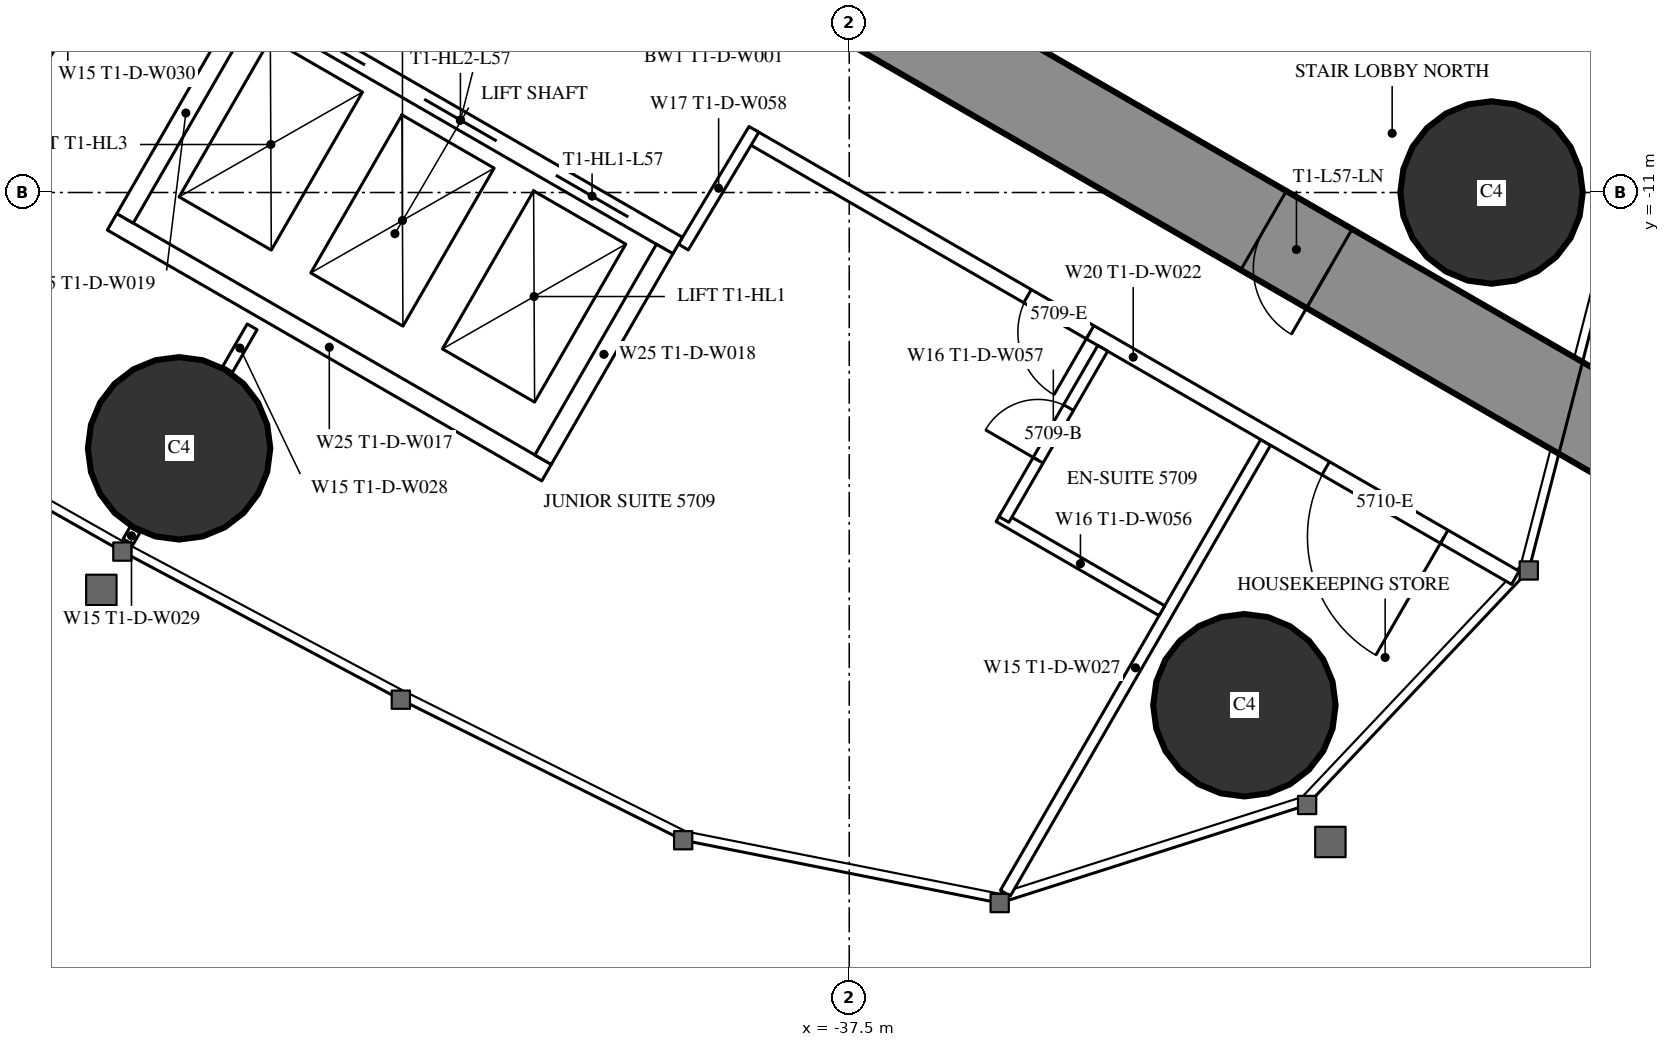
"""IFC4 building model, lengths in metres.
Left out: names, types, materials, properties, quantities, classifications, styles, units other than length and angle.
Written with IfcOpenShell. Run it as: python <this file> out.ifc"""

import sys

from ifc_helpers import new_model, si_unit, direction, frame, frame_2d, origin, origin_2d, place, context, subcontext, project, spatial, rectangle, circle, extrude, element, fill, save


model = new_model("IFC4")
c1 = context("Model", 3, precision=1e-05, world=origin(), true_north=direction((0.0, 1.0)))
c2 = subcontext(c1, "Body", "Model", "MODEL_VIEW")
j1 = project(units=[si_unit("LENGTHUNIT", "METRE"), si_unit("PLANEANGLEUNIT", "RADIAN")], contexts=[c1])
p1 = place(None, origin())
s1 = spatial("IfcSite", under=j1, at=p1, CompositionType="ELEMENT")
p2 = place(p1, origin())
s2 = spatial("IfcBuilding", under=s1, at=p2, CompositionType="ELEMENT")
p3 = place(p2, frame((0.0, 0.0, 215.3)))
s3 = spatial("IfcBuildingStorey", under=s2, at=p3, CompositionType="ELEMENT", Elevation=215.3)
for number, where, z_axis, x_axis in (
    (1, (-32.301, -17.745, 0.0), (0.0, 0.0, 1.0), (1.0, 0.0, 0.0)),
    (2, (-29.05, -11.0, 0.0), (0.0, 0.0, 1.0), (1.0, 0.0, 0.0)),
    (3, (-46.317, -14.365, 0.0), (0.0, 0.0, 1.0), (1.0, 0.0, 0.0)),
):
    element("IfcColumn", number, at=place(p3, frame(where, z_axis=z_axis, x_axis=x_axis)), inside=s3, PredefinedType="COLUMN", context=c2, shape_type="SweptSolid", body=[
        extrude(circle(Radius=1.2, at=origin_2d()), origin(), (0.0, 0.0, 1.0), 3.6),
    ])
p4 = place(p3, frame((-27.2, -14.3, 0.0), z_axis=(0.0, 0.0, 1.0), x_axis=(-0.866024021859, 0.500002393557, 0.0)))
e4 = element("IfcWall", 4, at=p4, inside=s3, PredefinedType="SHEAR", context=c2, shape_type="SweptSolid", body=[
    extrude(rectangle(XDim=27.907, YDim=1.2, at=frame_2d((13.954, 0.0))), origin(), (0.0, 0.0, 1.0), 3.6),
])
p5 = place(p4, frame((4.6, 0.0, 0.0)))
e5 = element("IfcOpeningElement", 5, at=p5, cuts=e4, PredefinedType="OPENING", context=c2, shape_type="SweptSolid", body=[
    extrude(rectangle(XDim=1.0, YDim=2.2, at=frame_2d((0.5, 1.1))), frame((0.0, 0.61, 0.0), z_axis=(0.0, -1.0, 0.0), x_axis=(1.0, 0.0, 0.0)), (0.0, 0.0, 1.0), 1.22),
])
p6 = place(p4, frame((13.395, 0.0, 0.0)))
e6 = element("IfcOpeningElement", 6, at=p6, cuts=e4, PredefinedType="OPENING", context=c2, shape_type="SweptSolid", body=[
    extrude(rectangle(XDim=1.8, YDim=2.2, at=frame_2d((0.9, 1.1))), frame((0.0, 0.61, 0.0), z_axis=(0.0, -1.0, 0.0), x_axis=(1.0, 0.0, 0.0)), (0.0, 0.0, 1.0), 1.22),
])
p7 = place(p3, frame((-32.022, -14.287, 0.0), z_axis=(0.0, 0.0, 1.0), x_axis=(-0.50000019414, -0.866025291697, 0.0)))
e7 = element("IfcWall", 7, at=p7, inside=s3, PredefinedType="PARTITIONING", context=c2, shape_type="SweptSolid", body=[
    extrude(rectangle(XDim=6.848, YDim=0.15, at=frame_2d((3.424, 0.0))), origin(), (0.0, 0.0, 1.0), 3.35),
])
p8 = place(p3, frame((-46.898, -15.439, 0.0), z_axis=(0.0, 0.0, 1.0), x_axis=(-0.500232303069, -0.865891241997, 0.0)))
e8 = element("IfcWall", 8, at=p8, inside=s3, PredefinedType="PARTITIONING", context=c2, shape_type="SweptSolid", body=[
    extrude(rectangle(XDim=0.18, YDim=0.15, at=frame_2d((0.09, 0.0))), origin(), (0.0, 0.0, 1.0), 2.45),
])
p9 = place(p3, frame((-46.274, -6.059, 0.0), z_axis=(0.0, 0.0, 1.0), x_axis=(-0.500020471368, -0.866013584312, 0.0)))
e9 = element("IfcWall", 9, at=p9, inside=s3, PredefinedType="PARTITIONING", context=c2, shape_type="SweptSolid", body=[
    extrude(rectangle(XDim=6.028, YDim=0.15, at=frame_2d((3.014, 0.0))), origin(), (0.0, 0.0, 1.0), 2.45),
])
p10 = place(p3, frame((-45.356, -12.767, 0.0), z_axis=(0.0, 0.0, 1.0), x_axis=(-0.499886366516, -0.866091000168, 0.0)))
e10 = element("IfcWall", 10, at=p10, inside=s3, PredefinedType="PARTITIONING", context=c2, shape_type="SweptSolid", body=[
    extrude(rectangle(XDim=0.645, YDim=0.15, at=frame_2d((0.322, 0.0))), origin(), (0.0, 0.0, 1.0), 3.35),
])
p11 = place(p3, frame((-28.737, -16.068, 0.0), z_axis=(0.0, 0.0, 1.0), x_axis=(-0.866029399323, 0.49999307946, 0.0)))
e11 = element("IfcWall", 11, at=p11, inside=s3, PredefinedType="PARTITIONING", context=c2, shape_type="SweptSolid", body=[
    extrude(rectangle(XDim=11.61, YDim=0.2, at=frame_2d((5.805, 0.0))), origin(), (0.0, 0.0, 1.0), 3.35),
])
p12 = place(p11, frame((1.08, 0.0, 0.0)))
e12 = element("IfcOpeningElement", 12, at=p12, cuts=e11, PredefinedType="OPENING", context=c2, shape_type="SweptSolid", body=[
    extrude(rectangle(XDim=1.8, YDim=2.03, at=frame_2d((0.9, 1.015))), frame((0.0, 0.11, 0.0), z_axis=(0.0, -1.0, 0.0), x_axis=(1.0, 0.0, 0.0)), (0.0, 0.0, 1.0), 0.22),
])
p13 = place(p11, frame((6.46, 0.0, 0.0)))
e13 = element("IfcOpeningElement", 13, at=p13, cuts=e11, PredefinedType="OPENING", context=c2, shape_type="SweptSolid", body=[
    extrude(rectangle(XDim=0.95, YDim=2.2, at=frame_2d((0.475, 1.1))), frame((0.0, 0.11, 0.0), z_axis=(0.0, -1.0, 0.0), x_axis=(1.0, 0.0, 0.0)), (0.0, 0.0, 1.0), 0.22),
])
p14 = place(p3, frame((-39.683, -11.718, 0.0), z_axis=(0.0, 0.0, 1.0), x_axis=(0.514336634837, 0.857588377991, 0.0)))
e14 = element("IfcWall", 14, at=p14, inside=s3, PredefinedType="PARTITIONING", context=c2, shape_type="SweptSolid", body=[
    extrude(rectangle(XDim=1.805, YDim=0.15, at=frame_2d((0.903, 0.0))), origin(), (0.0, 0.0, 1.0), 3.35),
])
p15 = place(p3, frame((-33.387, -16.502, 0.0), z_axis=(0.0, 0.0, 1.0), x_axis=(-0.866006523861, 0.500032699561, 0.0)))
e15 = element("IfcWall", 15, at=p15, inside=s3, PredefinedType="PARTITIONING", context=c2, shape_type="SweptSolid", body=[
    extrude(rectangle(XDim=2.475, YDim=0.15, at=frame_2d((1.237, 0.0))), origin(), (0.0, 0.0, 1.0), 3.35),
])
p16 = place(p3, frame((-34.165, -13.05, 0.0), z_axis=(0.0, 0.0, 1.0), x_axis=(-0.500047596559, -0.865997922154, 0.0)))
e16 = element("IfcWall", 16, at=p16, inside=s3, PredefinedType="PARTITIONING", context=c2, shape_type="SweptSolid", body=[
    extrude(rectangle(XDim=2.6, YDim=0.15, at=frame_2d((1.3, 0.0))), origin(), (0.0, 0.0, 1.0), 3.35),
])
p17 = place(p16, frame((0.9, 0.0, 0.0)))
e17 = element("IfcOpeningElement", 17, at=p17, cuts=e16, PredefinedType="OPENING", context=c2, shape_type="SweptSolid", body=[
    extrude(rectangle(XDim=0.8, YDim=2.2, at=frame_2d((0.4, 1.1))), frame((0.0, 0.085, 0.0), z_axis=(0.0, -1.0, 0.0), x_axis=(1.0, 0.0, 0.0)), (0.0, 0.0, 1.0), 0.17),
])
p18 = place(p3, frame((-39.758, -11.697, 0.0), z_axis=(0.0, 0.0, 1.0), x_axis=(-0.866024194504, 0.500002094529, 0.0)))
e18 = element("IfcWall", 18, at=p18, inside=s3, PredefinedType="PARTITIONING", context=c2, shape_type="SweptSolid", body=[
    extrude(rectangle(XDim=6.6, YDim=0.25, at=frame_2d((3.3, 0.0))), origin(), (0.0, 0.0, 1.0), 3.35),
])
p19 = place(p18, frame((0.75, 0.0, 0.0)))
e19 = element("IfcOpeningElement", 19, at=p19, cuts=e18, PredefinedType="OPENING", context=c2, shape_type="SweptSolid", body=[
    extrude(rectangle(XDim=1.1, YDim=2.2, at=frame_2d((0.55, 1.1))), frame((0.0, 0.135, 0.0), z_axis=(0.0, -1.0, 0.0), x_axis=(1.0, 0.0, 0.0)), (0.0, 0.0, 1.0), 0.27),
])
p20 = place(p18, frame((2.75, 0.0, 0.0)))
e20 = element("IfcOpeningElement", 20, at=p20, cuts=e18, PredefinedType="OPENING", context=c2, shape_type="SweptSolid", body=[
    extrude(rectangle(XDim=1.1, YDim=2.2, at=frame_2d((0.55, 1.1))), frame((0.0, 0.135, 0.0), z_axis=(0.0, -1.0, 0.0), x_axis=(1.0, 0.0, 0.0)), (0.0, 0.0, 1.0), 0.27),
])
p21 = place(p18, frame((4.75, 0.0, 0.0)))
e21 = element("IfcOpeningElement", 21, at=p21, cuts=e18, PredefinedType="OPENING", context=c2, shape_type="SweptSolid", body=[
    extrude(rectangle(XDim=1.1, YDim=2.2, at=frame_2d((0.55, 1.1))), frame((0.0, 0.135, 0.0), z_axis=(0.0, -1.0, 0.0), x_axis=(1.0, 0.0, 0.0)), (0.0, 0.0, 1.0), 0.27),
])
p22 = place(p3, frame((-41.482, -14.686, 0.0), z_axis=(0.0, 0.0, 1.0), x_axis=(-0.86603344179, 0.499986077507, 0.0)))
e22 = element("IfcWall", 22, at=p22, inside=s3, PredefinedType="PARTITIONING", context=c2, shape_type="SweptSolid", body=[
    extrude(rectangle(XDim=6.6, YDim=0.25, at=frame_2d((3.3, 0.0))), origin(), (0.0, 0.0, 1.0), 3.35),
])
for number, where, z_axis, x_axis in (
    (23, (-39.928, -11.743, 0.0), (0.0, 0.0, 1.0), (-0.5, -0.866, 0.0)),
    (24, (-45.428, -8.568, 0.0), (0.0, 0.0, 1.0), (-0.5, -0.866, 0.0)),
):
    element("IfcWall", number, at=place(p3, frame(where, z_axis=z_axis, x_axis=x_axis)), inside=s3, PredefinedType="PARTITIONING", context=c2, shape_type="SweptSolid", body=[
        extrude(rectangle(XDim=3.201, YDim=0.25, at=frame_2d((1.6, 0.0))), origin(), (0.0, 0.0, 1.0), 3.35),
    ])
p23 = place(p12, origin())
e25 = element("IfcDoor", 25, at=p23, inside=s3, OperationType="DOUBLE_DOOR_SINGLE_SWING", PredefinedType="DOOR", context=c2, shape_type="SweptSolid", body=[
    extrude(rectangle(XDim=1.8, YDim=2.03, at=frame_2d((0.9, 1.015))), frame((0.0, 0.025, 0.0), z_axis=(0.0, -1.0, 0.0), x_axis=(1.0, 0.0, 0.0)), (0.0, 0.0, 1.0), 0.05),
])
fill(e12, e25)
p24 = place(p17, origin())
e26 = element("IfcDoor", 26, at=p24, inside=s3, OperationType="SINGLE_SWING_RIGHT", PredefinedType="DOOR", context=c2, shape_type="SweptSolid", body=[
    extrude(rectangle(XDim=0.8, YDim=2.2, at=frame_2d((0.4, 1.1))), frame((0.0, 0.025, 0.0), z_axis=(0.0, -1.0, 0.0), x_axis=(1.0, 0.0, 0.0)), (0.0, 0.0, 1.0), 0.05),
])
fill(e17, e26)
p25 = place(p13, origin())
e27 = element("IfcDoor", 27, at=p25, inside=s3, OperationType="SINGLE_SWING_LEFT", PredefinedType="DOOR", context=c2, shape_type="SweptSolid", body=[
    extrude(rectangle(XDim=0.95, YDim=2.2, at=frame_2d((0.475, 1.1))), frame((0.0, 0.025, 0.0), z_axis=(0.0, -1.0, 0.0), x_axis=(1.0, 0.0, 0.0)), (0.0, 0.0, 1.0), 0.05),
])
fill(e13, e27)
p26 = place(p5, origin())
e28 = element("IfcDoor", 28, at=p26, inside=s3, OperationType="SINGLE_SWING_LEFT", PredefinedType="DOOR", context=c2, shape_type="SweptSolid", body=[
    extrude(rectangle(XDim=1.0, YDim=2.2, at=frame_2d((0.5, 1.1))), frame((0.0, 0.025, 0.0), z_axis=(0.0, -1.0, 0.0), x_axis=(1.0, 0.0, 0.0)), (0.0, 0.0, 1.0), 0.05),
])
fill(e5, e28)
p27 = place(p19, origin())
e29 = element("IfcDoor", 29, at=p27, inside=s3, OperationType="DOUBLE_DOOR_SLIDING", PredefinedType="USERDEFINED", context=c2, shape_type="SweptSolid", body=[
    extrude(rectangle(XDim=1.1, YDim=2.2, at=frame_2d((0.55, 1.1))), frame((0.0, 0.025, 0.0), z_axis=(0.0, -1.0, 0.0), x_axis=(1.0, 0.0, 0.0)), (0.0, 0.0, 1.0), 0.05),
])
fill(e19, e29)
p28 = place(p20, origin())
e30 = element("IfcDoor", 30, at=p28, inside=s3, OperationType="DOUBLE_DOOR_SLIDING", PredefinedType="USERDEFINED", context=c2, shape_type="SweptSolid", body=[
    extrude(rectangle(XDim=1.1, YDim=2.2, at=frame_2d((0.55, 1.1))), frame((0.0, 0.025, 0.0), z_axis=(0.0, -1.0, 0.0), x_axis=(1.0, 0.0, 0.0)), (0.0, 0.0, 1.0), 0.05),
])
fill(e20, e30)
p29 = place(p21, origin())
e31 = element("IfcDoor", 31, at=p29, inside=s3, OperationType="DOUBLE_DOOR_SLIDING", PredefinedType="USERDEFINED", context=c2, shape_type="SweptSolid", body=[
    extrude(rectangle(XDim=1.1, YDim=2.2, at=frame_2d((0.55, 1.1))), frame((0.0, 0.025, 0.0), z_axis=(0.0, -1.0, 0.0), x_axis=(1.0, 0.0, 0.0)), (0.0, 0.0, 1.0), 0.05),
])
fill(e21, e31)
save(model, sys.argv[1])
